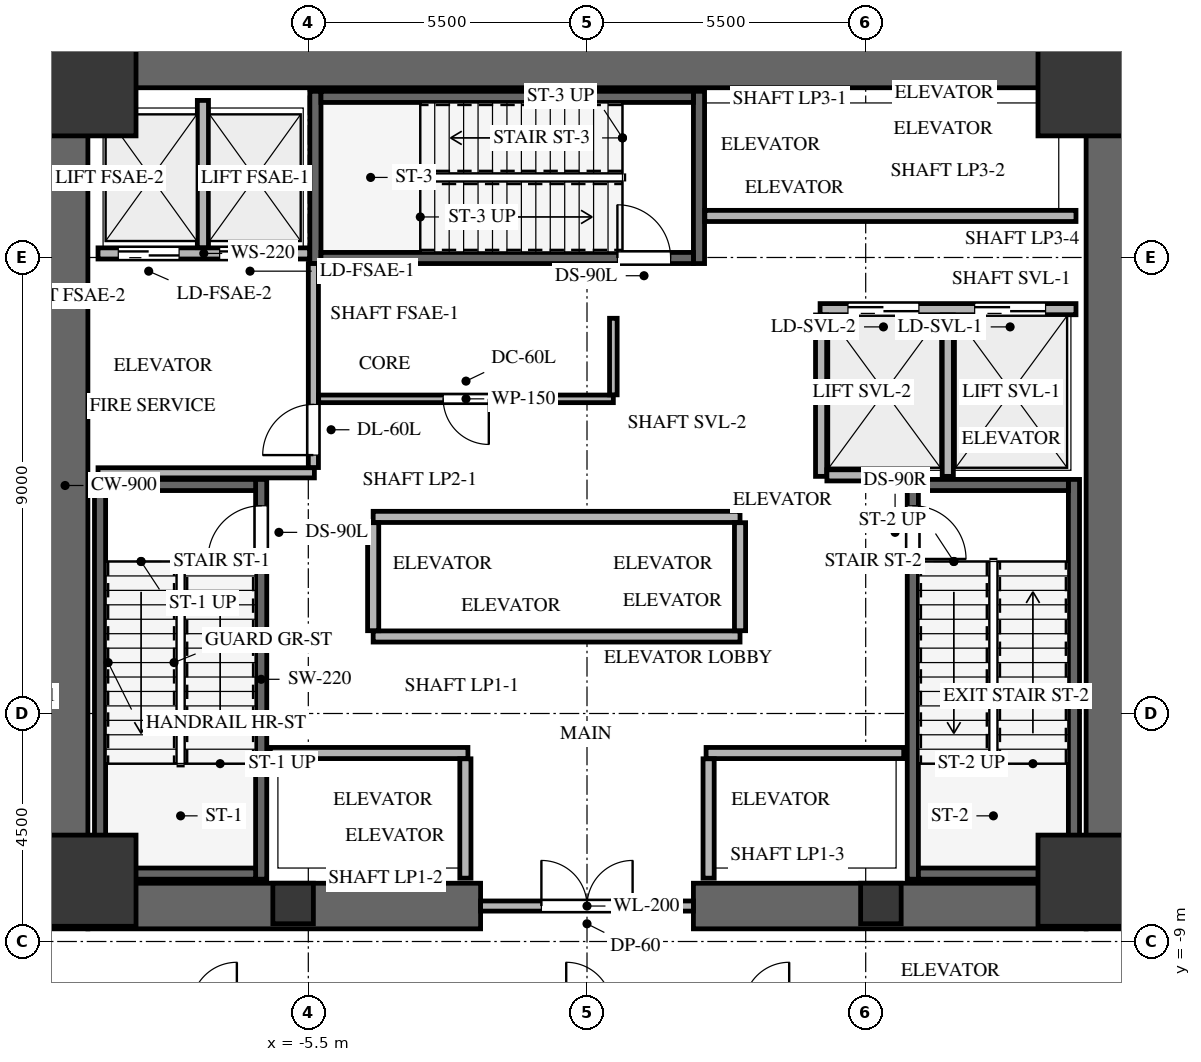
"""IFC4 building model, lengths in metres.
Left out: names, types, materials, properties, quantities, classifications, styles, units other than length and angle.
Written with IfcOpenShell. Run it as: python <this file> out.ifc"""

import sys

from ifc_helpers import new_model, si_unit, direction, frame, frame_2d, origin, origin_2d, place, context, subcontext, project, spatial, rectangle, extrude, source, transform, mapped, element, fill, save


model = new_model("IFC4")
c1 = context("Model", 3, precision=1e-05, world=origin(), true_north=direction((0.0, 1.0)))
c2 = subcontext(c1, "Body", "Model", "MODEL_VIEW")
j1 = project(units=[si_unit("LENGTHUNIT", "METRE"), si_unit("PLANEANGLEUNIT", "RADIAN")], contexts=[c1])
p1 = place(None, origin())
s1 = spatial("IfcSite", under=j1, at=p1, CompositionType="ELEMENT")
p2 = place(p1, origin())
s2 = spatial("IfcBuilding", under=s1, at=p2, CompositionType="ELEMENT")
p3 = place(p2, frame((0.0, 0.0, 10.4)))
s3 = spatial("IfcBuildingStorey", under=s2, at=p3, CompositionType="ELEMENT", Elevation=10.4)
for number, where, z_axis, x_axis in (
    (1, (-10.3, -8.75, 0.0), (0.0, 0.0, 1.0), (0.0, 1.0, 0.0)),
    (2, (10.3, -8.75, 0.0), (0.0, 0.0, 1.0), (0.0, 1.0, 0.0)),
):
    element("IfcWall", number, at=place(p3, frame(where, z_axis=z_axis, x_axis=x_axis)), inside=s3, PredefinedType="SHEAR", context=c2, shape_type="SweptSolid", body=[
        extrude(rectangle(XDim=17.5, YDim=0.9, at=frame_2d((8.75, 0.0))), origin(), (0.0, 0.0, 1.0), 5.2),
    ])
for number, where, z_axis, x_axis in (
    (3, (-9.85, -8.3, 0.0), (0.0, 0.0, 1.0), (1.0, 0.0, 0.0)),
    (4, (2.1, -8.3, 0.0), (0.0, 0.0, 1.0), (1.0, 0.0, 0.0)),
):
    element("IfcWall", number, at=place(p3, frame(where, z_axis=z_axis, x_axis=x_axis)), inside=s3, PredefinedType="SHEAR", context=c2, shape_type="SweptSolid", body=[
        extrude(rectangle(XDim=7.75, YDim=0.9, at=frame_2d((3.875, 0.0))), origin(), (0.0, 0.0, 1.0), 5.2),
    ])
p4 = place(p3, frame((-9.85, 8.3, 0.0), z_axis=(0.0, 0.0, 1.0), x_axis=(1.0, 0.0, 0.0)))
e5 = element("IfcWall", 5, at=p4, inside=s3, PredefinedType="SHEAR", context=c2, shape_type="SweptSolid", body=[
    extrude(rectangle(XDim=19.7, YDim=0.9, at=frame_2d((9.85, 0.0))), origin(), (0.0, 0.0, 1.0), 5.2),
])
p5 = place(p3, frame((-6.43, -7.77, -0.35), z_axis=(0.0, 0.0, 1.0), x_axis=(0.0, 1.0, 0.0)))
e6 = element("IfcWall", 6, at=p5, inside=s3, PredefinedType="SHEAR", context=c2, shape_type="SweptSolid", body=[
    extrude(rectangle(XDim=7.89, YDim=0.22, at=frame_2d((3.945, 0.0))), origin(), (0.0, 0.0, 1.0), 5.23),
])
p6 = place(p5, frame((6.32, 0.0, 0.0)))
e7 = element("IfcOpeningElement", 7, at=p6, cuts=e6, PredefinedType="OPENING", context=c2, shape_type="SweptSolid", body=[
    extrude(rectangle(XDim=1.05, YDim=2.15, at=frame_2d((0.525, 1.075))), frame((0.0, 0.12, 0.0), z_axis=(0.0, -1.0, 0.0), x_axis=(1.0, 0.0, 0.0)), (0.0, 0.0, 1.0), 0.24),
])
p7 = place(p3, frame((-9.61, 0.12, -0.35), z_axis=(0.0, 0.0, 1.0), x_axis=(0.0, -1.0, 0.0)))
e8 = element("IfcWall", 8, at=p7, inside=s3, PredefinedType="SHEAR", context=c2, shape_type="SweptSolid", body=[
    extrude(rectangle(XDim=7.89, YDim=0.22, at=frame_2d((3.945, 0.0))), origin(), (0.0, 0.0, 1.0), 5.23),
])
for number, where, z_axis, x_axis in (
    (9, (-9.5, -7.66, -0.35), (0.0, 0.0, 1.0), (1.0, 0.0, 0.0)),
    (10, (-6.54, 0.01, -0.35), (0.0, 0.0, 1.0), (-1.0, 0.0, 0.0)),
):
    element("IfcWall", number, at=place(p3, frame(where, z_axis=z_axis, x_axis=x_axis)), inside=s3, PredefinedType="SHEAR", context=c2, shape_type="SweptSolid", body=[
        extrude(rectangle(XDim=2.96, YDim=0.22, at=frame_2d((1.48, 0.0))), origin(), (0.0, 0.0, 1.0), 5.23),
    ])
p8 = place(p3, frame((9.61, -7.77, -0.35), z_axis=(0.0, 0.0, 1.0), x_axis=(0.0, 1.0, 0.0)))
e11 = element("IfcWall", 11, at=p8, inside=s3, PredefinedType="SHEAR", context=c2, shape_type="SweptSolid", body=[
    extrude(rectangle(XDim=7.89, YDim=0.22, at=frame_2d((3.945, 0.0))), origin(), (0.0, 0.0, 1.0), 5.23),
])
p9 = place(p3, frame((6.43, 0.12, -0.35), z_axis=(0.0, 0.0, 1.0), x_axis=(0.0, -1.0, 0.0)))
e12 = element("IfcWall", 12, at=p9, inside=s3, PredefinedType="SHEAR", context=c2, shape_type="SweptSolid", body=[
    extrude(rectangle(XDim=7.89, YDim=0.22, at=frame_2d((3.945, 0.0))), origin(), (0.0, 0.0, 1.0), 5.23),
])
p10 = place(p9, frame((0.52, 0.0, 0.0)))
e13 = element("IfcOpeningElement", 13, at=p10, cuts=e12, PredefinedType="OPENING", context=c2, shape_type="SweptSolid", body=[
    extrude(rectangle(XDim=1.05, YDim=2.15, at=frame_2d((0.525, 1.075))), frame((0.0, 0.12, 0.0), z_axis=(0.0, -1.0, 0.0), x_axis=(1.0, 0.0, 0.0)), (0.0, 0.0, 1.0), 0.24),
])
for number, where, z_axis, x_axis in (
    (14, (6.54, -7.66, -0.35), (0.0, 0.0, 1.0), (1.0, 0.0, 0.0)),
    (15, (9.5, 0.01, -0.35), (0.0, 0.0, 1.0), (-1.0, 0.0, 0.0)),
):
    element("IfcWall", number, at=place(p3, frame(where, z_axis=z_axis, x_axis=x_axis)), inside=s3, PredefinedType="SHEAR", context=c2, shape_type="SweptSolid", body=[
        extrude(rectangle(XDim=2.96, YDim=0.22, at=frame_2d((1.48, 0.0))), origin(), (0.0, 0.0, 1.0), 5.23),
    ])
for number, where, z_axis, x_axis in (
    (16, (2.21, 4.38, -0.35), (0.0, 0.0, 1.0), (0.0, 1.0, 0.0)),
    (17, (-5.36, 7.78, -0.35), (0.0, 0.0, 1.0), (0.0, -1.0, 0.0)),
):
    element("IfcWall", number, at=place(p3, frame(where, z_axis=z_axis, x_axis=x_axis)), inside=s3, PredefinedType="SHEAR", context=c2, shape_type="SweptSolid", body=[
        extrude(rectangle(XDim=3.4, YDim=0.22, at=frame_2d((1.7, 0.0))), origin(), (0.0, 0.0, 1.0), 5.23),
    ])
p11 = place(p3, frame((-5.25, 4.49, -0.35), z_axis=(0.0, 0.0, 1.0), x_axis=(1.0, 0.0, 0.0)))
e18 = element("IfcWall", 18, at=p11, inside=s3, PredefinedType="SHEAR", context=c2, shape_type="SweptSolid", body=[
    extrude(rectangle(XDim=7.35, YDim=0.22, at=frame_2d((3.675, 0.0))), origin(), (0.0, 0.0, 1.0), 5.23),
])
p12 = place(p11, frame((5.85, 0.0, 0.0)))
e19 = element("IfcOpeningElement", 19, at=p12, cuts=e18, PredefinedType="OPENING", context=c2, shape_type="SweptSolid", body=[
    extrude(rectangle(XDim=1.05, YDim=2.15, at=frame_2d((0.525, 1.075))), frame((0.0, 0.12, 0.0), z_axis=(0.0, -1.0, 0.0), x_axis=(1.0, 0.0, 0.0)), (0.0, 0.0, 1.0), 0.24),
])
p13 = place(p3, frame((2.1, 7.67, -0.35), z_axis=(0.0, 0.0, 1.0), x_axis=(-1.0, 0.0, 0.0)))
e20 = element("IfcWall", 20, at=p13, inside=s3, PredefinedType="SHEAR", context=c2, shape_type="SweptSolid", body=[
    extrude(rectangle(XDim=7.35, YDim=0.22, at=frame_2d((3.675, 0.0))), origin(), (0.0, 0.0, 1.0), 5.23),
])
m1 = source(origin(), c2, "Body", "SweptSolid", [
    extrude(rectangle(XDim=1.8, YDim=1.8, at=origin_2d()), origin(), (0.0, 0.0, 1.0), 5.23),
])
for number, where, z_axis, x_axis in (
    (21, (-9.8, -7.8, -0.35), (0.0, 0.0, 1.0), (1.0, 0.0, 0.0)),
    (22, (9.8, -7.8, -0.35), (0.0, 0.0, 1.0), (1.0, 0.0, 0.0)),
    (23, (9.8, 7.8, -0.35), (0.0, 0.0, 1.0), (1.0, 0.0, 0.0)),
    (24, (-9.8, 7.8, -0.35), (0.0, 0.0, 1.0), (1.0, 0.0, 0.0)),
):
    element("IfcColumn", number, at=place(p3, frame(where, z_axis=z_axis, x_axis=x_axis)), inside=s3, PredefinedType="COLUMN", context=c2, shape_type="MappedRepresentation", body=[
        mapped(m1, transform((0.0, 0.0, 0.0), x_axis=(1.0, 0.0, 0.0), y_axis=(0.0, 1.0, 0.0), z_axis=(0.0, 0.0, 1.0), scale=1.0)),
    ])
m2 = source(origin(), c2, "Body", "SweptSolid", [
    extrude(rectangle(XDim=0.8, YDim=0.8, at=origin_2d()), origin(), (0.0, 0.0, 1.0), 5.23),
])
for number, where, z_axis, x_axis in (
    (25, (-5.8, -8.25, -0.35), (0.0, 0.0, 1.0), (1.0, 0.0, 0.0)),
    (26, (5.8, -8.25, -0.35), (0.0, 0.0, 1.0), (1.0, 0.0, 0.0)),
):
    element("IfcColumn", number, at=place(p3, frame(where, z_axis=z_axis, x_axis=x_axis)), inside=s3, PredefinedType="PILASTER", context=c2, shape_type="MappedRepresentation", body=[
        mapped(m2, transform((0.0, 0.0, 0.0), x_axis=(1.0, 0.0, 0.0), y_axis=(0.0, 1.0, 0.0), z_axis=(0.0, 0.0, 1.0), scale=1.0)),
    ])
p14 = place(p3, frame((-2.1, -8.3, 0.0), z_axis=(0.0, 0.0, 1.0), x_axis=(1.0, 0.0, 0.0)))
e27 = element("IfcWall", 27, at=p14, inside=s3, PredefinedType="SOLIDWALL", context=c2, shape_type="SweptSolid", body=[
    extrude(rectangle(XDim=4.2, YDim=0.2, at=frame_2d((2.1, 0.0))), origin(), (0.0, 0.0, 1.0), 4.865),
])
p15 = place(p14, frame((1.2, 0.0, 0.0)))
e28 = element("IfcOpeningElement", 28, at=p15, cuts=e27, PredefinedType="OPENING", context=c2, shape_type="SweptSolid", body=[
    extrude(rectangle(XDim=1.8, YDim=2.15, at=frame_2d((0.9, 1.075))), frame((0.0, 0.11, 0.0), z_axis=(0.0, -1.0, 0.0), x_axis=(1.0, 0.0, 0.0)), (0.0, 0.0, 1.0), 0.22),
])
p16 = place(p3, frame((-9.65, 4.58, 0.0), z_axis=(0.0, 0.0, 1.0), x_axis=(1.0, 0.0, 0.0)))
e29 = element("IfcWall", 29, at=p16, inside=s3, PredefinedType="SOLIDWALL", context=c2, shape_type="SweptSolid", body=[
    extrude(rectangle(XDim=4.175, YDim=0.22, at=frame_2d((2.087, 0.0))), origin(), (0.0, 0.0, 1.0), 4.865),
])
p17 = place(p16, frame((0.4, 0.0, 0.0)))
e30 = element("IfcOpeningElement", 30, at=p17, cuts=e29, PredefinedType="OPENING", context=c2, shape_type="SweptSolid", body=[
    extrude(rectangle(XDim=1.2, YDim=2.15, at=frame_2d((0.6, 1.075))), frame((0.0, 0.12, 0.0), z_axis=(0.0, -1.0, 0.0), x_axis=(1.0, 0.0, 0.0)), (0.0, 0.0, 1.0), 0.24),
])
p18 = place(p16, frame((2.4, 0.0, 0.0)))
e31 = element("IfcOpeningElement", 31, at=p18, cuts=e29, PredefinedType="OPENING", context=c2, shape_type="SweptSolid", body=[
    extrude(rectangle(XDim=1.2, YDim=2.15, at=frame_2d((0.6, 1.075))), frame((0.0, 0.12, 0.0), z_axis=(0.0, -1.0, 0.0), x_axis=(1.0, 0.0, 0.0)), (0.0, 0.0, 1.0), 0.24),
])
p19 = place(p3, frame((-7.58, 4.694, 0.0), z_axis=(0.0, 0.0, 1.0), x_axis=(0.0, 1.0, 0.0)))
e32 = element("IfcWall", 32, at=p19, inside=s3, PredefinedType="SOLIDWALL", context=c2, shape_type="SweptSolid", body=[
    extrude(rectangle(XDim=2.906, YDim=0.22, at=frame_2d((1.453, 0.0))), origin(), (0.0, 0.0, 1.0), 4.865),
])
p20 = place(p3, frame((-9.65, 0.25, 0.0), z_axis=(0.0, 0.0, 1.0), x_axis=(1.0, 0.0, 0.0)))
e33 = element("IfcWall", 33, at=p20, inside=s3, PredefinedType="SOLIDWALL", context=c2, shape_type="SweptSolid", body=[
    extrude(rectangle(XDim=4.27, YDim=0.2, at=frame_2d((2.135, 0.0))), origin(), (0.0, 0.0, 1.0), 4.865),
])
p21 = place(p3, frame((-5.4, 0.354, 0.0), z_axis=(0.0, 0.0, 1.0), x_axis=(0.0, 1.0, 0.0)))
e34 = element("IfcWall", 34, at=p21, inside=s3, PredefinedType="SOLIDWALL", context=c2, shape_type="SweptSolid", body=[
    extrude(rectangle(XDim=4.026, YDim=0.2, at=frame_2d((2.013, 0.0))), origin(), (0.0, 0.0, 1.0), 4.865),
])
p22 = place(p21, frame((0.246, 0.0, 0.0)))
e35 = element("IfcOpeningElement", 35, at=p22, cuts=e34, PredefinedType="OPENING", context=c2, shape_type="SweptSolid", body=[
    extrude(rectangle(XDim=1.0, YDim=2.15, at=frame_2d((0.5, 1.075))), frame((0.0, 0.11, 0.0), z_axis=(0.0, -1.0, 0.0), x_axis=(1.0, 0.0, 0.0)), (0.0, 0.0, 1.0), 0.22),
])
p23 = place(p3, frame((4.6, 3.48, 0.0), z_axis=(0.0, 0.0, 1.0), x_axis=(1.0, 0.0, 0.0)))
e36 = element("IfcWall", 36, at=p23, inside=s3, PredefinedType="SOLIDWALL", context=c2, shape_type="SweptSolid", body=[
    extrude(rectangle(XDim=5.05, YDim=0.22, at=frame_2d((2.525, 0.0))), origin(), (0.0, 0.0, 1.0), 4.865),
])
p24 = place(p23, frame((0.55, 0.0, 0.0)))
e37 = element("IfcOpeningElement", 37, at=p24, cuts=e36, PredefinedType="OPENING", context=c2, shape_type="SweptSolid", body=[
    extrude(rectangle(XDim=1.4, YDim=2.15, at=frame_2d((0.7, 1.075))), frame((0.0, 0.12, 0.0), z_axis=(0.0, -1.0, 0.0), x_axis=(1.0, 0.0, 0.0)), (0.0, 0.0, 1.0), 0.24),
])
p25 = place(p23, frame((3.05, 0.0, 0.0)))
e38 = element("IfcOpeningElement", 38, at=p25, cuts=e36, PredefinedType="OPENING", context=c2, shape_type="SweptSolid", body=[
    extrude(rectangle(XDim=1.4, YDim=2.15, at=frame_2d((0.7, 1.075))), frame((0.0, 0.12, 0.0), z_axis=(0.0, -1.0, 0.0), x_axis=(1.0, 0.0, 0.0)), (0.0, 0.0, 1.0), 0.24),
])
for number, where, z_axis, x_axis in (
    (39, (4.62, 0.18, 0.0), (0.0, 0.0, 1.0), (0.0, 1.0, 0.0)),
    (40, (7.12, 0.18, 0.0), (0.0, 0.0, 1.0), (0.0, 1.0, 0.0)),
):
    element("IfcWall", number, at=place(p3, frame(where, z_axis=z_axis, x_axis=x_axis)), inside=s3, PredefinedType="SOLIDWALL", context=c2, shape_type="SweptSolid", body=[
        extrude(rectangle(XDim=3.186, YDim=0.22, at=frame_2d((1.593, 0.0))), origin(), (0.0, 0.0, 1.0), 4.865),
    ])
p26 = place(p3, frame((4.734, 0.2, 0.0), z_axis=(0.0, 0.0, 1.0), x_axis=(1.0, 0.0, 0.0)))
e41 = element("IfcWall", 41, at=p26, inside=s3, PredefinedType="SOLIDWALL", context=c2, shape_type="SweptSolid", body=[
    extrude(rectangle(XDim=1.666, YDim=0.22, at=frame_2d((0.833, 0.0))), origin(), (0.0, 0.0, 1.0), 4.865),
])
for number, where, z_axis, x_axis in (
    (42, (-6.25, -5.28, 0.0), (0.0, 0.0, 1.0), (1.0, 0.0, 0.0)),
    (43, (2.35, -5.28, 0.0), (0.0, 0.0, 1.0), (1.0, 0.0, 0.0)),
):
    element("IfcWall", number, at=place(p3, frame(where, z_axis=z_axis, x_axis=x_axis)), inside=s3, PredefinedType="SOLIDWALL", context=c2, shape_type="SweptSolid", body=[
        extrude(rectangle(XDim=3.9, YDim=0.22, at=frame_2d((1.95, 0.0))), origin(), (0.0, 0.0, 1.0), 4.865),
    ])
for number, where, z_axis, x_axis in (
    (44, (-2.4, -7.75, 0.0), (0.0, 0.0, 1.0), (0.0, 1.0, 0.0)),
    (45, (2.4, -7.75, 0.0), (0.0, 0.0, 1.0), (0.0, 1.0, 0.0)),
):
    element("IfcWall", number, at=place(p3, frame(where, z_axis=z_axis, x_axis=x_axis)), inside=s3, PredefinedType="SOLIDWALL", context=c2, shape_type="SweptSolid", body=[
        extrude(rectangle(XDim=2.356, YDim=0.22, at=frame_2d((1.178, 0.0))), origin(), (0.0, 0.0, 1.0), 4.865),
    ])
for number, where, z_axis, x_axis in (
    (46, (-4.22, -2.98, 0.0), (0.0, 0.0, 1.0), (1.0, 0.0, 0.0)),
    (47, (-4.22, -0.62, 0.0), (0.0, 0.0, 1.0), (1.0, 0.0, 0.0)),
):
    element("IfcWall", number, at=place(p3, frame(where, z_axis=z_axis, x_axis=x_axis)), inside=s3, PredefinedType="SOLIDWALL", context=c2, shape_type="SweptSolid", body=[
        extrude(rectangle(XDim=7.24, YDim=0.22, at=frame_2d((3.62, 0.0))), origin(), (0.0, 0.0, 1.0), 4.865),
    ])
for number, where, z_axis, x_axis in (
    (48, (-4.22, -2.866, 0.0), (0.0, 0.0, 1.0), (0.0, 1.0, 0.0)),
    (49, (3.02, -2.866, 0.0), (0.0, 0.0, 1.0), (0.0, 1.0, 0.0)),
):
    element("IfcWall", number, at=place(p3, frame(where, z_axis=z_axis, x_axis=x_axis)), inside=s3, PredefinedType="SOLIDWALL", context=c2, shape_type="SweptSolid", body=[
        extrude(rectangle(XDim=2.132, YDim=0.22, at=frame_2d((1.066, 0.0))), origin(), (0.0, 0.0, 1.0), 4.865),
    ])
p27 = place(p3, frame((2.325, 5.32, 0.0), z_axis=(0.0, 0.0, 1.0), x_axis=(1.0, 0.0, 0.0)))
e50 = element("IfcWall", 50, at=p27, inside=s3, PredefinedType="SOLIDWALL", context=c2, shape_type="SweptSolid", body=[
    extrude(rectangle(XDim=7.325, YDim=0.22, at=frame_2d((3.663, 0.0))), origin(), (0.0, 0.0, 1.0), 4.865),
])
p28 = place(p3, frame((0.52, 1.71, 0.0), z_axis=(0.0, 0.0, 1.0), x_axis=(-1.0, 0.0, 0.0)))
e51 = element("IfcWall", 51, at=p28, inside=s3, PredefinedType="PARTITIONING", context=c2, shape_type="SweptSolid", body=[
    extrude(rectangle(XDim=5.816, YDim=0.15, at=frame_2d((2.908, 0.0))), origin(), (0.0, 0.0, 1.0), 4.865),
])
p29 = place(p28, frame((2.458, 0.0, 0.0)))
e52 = element("IfcOpeningElement", 52, at=p29, cuts=e51, PredefinedType="OPENING", context=c2, shape_type="SweptSolid", body=[
    extrude(rectangle(XDim=0.9, YDim=2.05, at=frame_2d((0.45, 1.025))), frame((0.0, 0.085, 0.0), z_axis=(0.0, -1.0, 0.0), x_axis=(1.0, 0.0, 0.0)), (0.0, 0.0, 1.0), 0.17),
])
p30 = place(p3, frame((0.52, 3.3, 0.0), z_axis=(0.0, 0.0, 1.0), x_axis=(0.0, -1.0, 0.0)))
e53 = element("IfcWall", 53, at=p30, inside=s3, PredefinedType="PARTITIONING", context=c2, shape_type="SweptSolid", body=[
    extrude(rectangle(XDim=1.511, YDim=0.15, at=frame_2d((0.755, 0.0))), origin(), (0.0, 0.0, 1.0), 4.865),
])
m3 = source(origin(), c2, "Body", "SweptSolid", [
    extrude(rectangle(XDim=1.05, YDim=2.15, at=frame_2d((0.525, 1.075))), frame((0.0, 0.025, 0.0), z_axis=(0.0, -1.0, 0.0), x_axis=(1.0, 0.0, 0.0)), (0.0, 0.0, 1.0), 0.05),
])
p31 = place(p6, origin())
e54 = element("IfcDoor", 54, at=p31, inside=s3, OperationType="SINGLE_SWING_LEFT", PredefinedType="DOOR", context=c2, shape_type="MappedRepresentation", body=[
    mapped(m3, transform((0.0, 0.0, 0.0), x_axis=(1.0, 0.0, 0.0), y_axis=(0.0, 1.0, 0.0), z_axis=(0.0, 0.0, 1.0), scale=1.0)),
])
fill(e7, e54)
m4 = source(origin(), c2, "Body", "SweptSolid", [
    extrude(rectangle(XDim=1.05, YDim=2.15, at=frame_2d((0.525, 1.075))), frame((0.0, 0.025, 0.0), z_axis=(0.0, -1.0, 0.0), x_axis=(1.0, 0.0, 0.0)), (0.0, 0.0, 1.0), 0.05),
])
p32 = place(p10, origin())
e55 = element("IfcDoor", 55, at=p32, inside=s3, OperationType="SINGLE_SWING_RIGHT", PredefinedType="DOOR", context=c2, shape_type="MappedRepresentation", body=[
    mapped(m4, transform((0.0, 0.0, 0.0), x_axis=(1.0, 0.0, 0.0), y_axis=(0.0, 1.0, 0.0), z_axis=(0.0, 0.0, 1.0), scale=1.0)),
])
fill(e13, e55)
p33 = place(p12, origin())
e56 = element("IfcDoor", 56, at=p33, inside=s3, OperationType="SINGLE_SWING_LEFT", PredefinedType="DOOR", context=c2, shape_type="MappedRepresentation", body=[
    mapped(m3, transform((0.0, 0.0, 0.0), x_axis=(1.0, 0.0, 0.0), y_axis=(0.0, 1.0, 0.0), z_axis=(0.0, 0.0, 1.0), scale=1.0)),
])
fill(e19, e56)
m5 = source(origin(), c2, "Body", "SweptSolid", [
    extrude(rectangle(XDim=1.8, YDim=2.15, at=frame_2d((0.9, 1.075))), frame((0.0, 0.025, 0.0), z_axis=(0.0, -1.0, 0.0), x_axis=(1.0, 0.0, 0.0)), (0.0, 0.0, 1.0), 0.05),
])
p34 = place(p15, origin())
e57 = element("IfcDoor", 57, at=p34, inside=s3, OperationType="DOUBLE_DOOR_SINGLE_SWING", PredefinedType="DOOR", context=c2, shape_type="MappedRepresentation", body=[
    mapped(m5, transform((0.0, 0.0, 0.0), x_axis=(1.0, 0.0, 0.0), y_axis=(0.0, 1.0, 0.0), z_axis=(0.0, 0.0, 1.0), scale=1.0)),
])
fill(e28, e57)
m6 = source(origin(), c2, "Body", "SweptSolid", [
    extrude(rectangle(XDim=1.2, YDim=2.15, at=frame_2d((0.6, 1.075))), frame((0.0, 0.025, 0.0), z_axis=(0.0, -1.0, 0.0), x_axis=(1.0, 0.0, 0.0)), (0.0, 0.0, 1.0), 0.05),
])
p35 = place(p17, origin())
e58 = element("IfcDoor", 58, at=p35, inside=s3, OperationType="DOUBLE_DOOR_SLIDING", PredefinedType="DOOR", context=c2, shape_type="MappedRepresentation", body=[
    mapped(m6, transform((0.0, 0.0, 0.0), x_axis=(1.0, 0.0, 0.0), y_axis=(0.0, 1.0, 0.0), z_axis=(0.0, 0.0, 1.0), scale=1.0)),
])
fill(e30, e58)
p36 = place(p18, origin())
e59 = element("IfcDoor", 59, at=p36, inside=s3, OperationType="DOUBLE_DOOR_SLIDING", PredefinedType="DOOR", context=c2, shape_type="MappedRepresentation", body=[
    mapped(m6, transform((0.0, 0.0, 0.0), x_axis=(1.0, 0.0, 0.0), y_axis=(0.0, 1.0, 0.0), z_axis=(0.0, 0.0, 1.0), scale=1.0)),
])
fill(e31, e59)
m7 = source(origin(), c2, "Body", "SweptSolid", [
    extrude(rectangle(XDim=1.0, YDim=2.15, at=frame_2d((0.5, 1.075))), frame((0.0, 0.025, 0.0), z_axis=(0.0, -1.0, 0.0), x_axis=(1.0, 0.0, 0.0)), (0.0, 0.0, 1.0), 0.05),
])
p37 = place(p22, origin())
e60 = element("IfcDoor", 60, at=p37, inside=s3, OperationType="SINGLE_SWING_LEFT", PredefinedType="DOOR", context=c2, shape_type="MappedRepresentation", body=[
    mapped(m7, transform((0.0, 0.0, 0.0), x_axis=(1.0, 0.0, 0.0), y_axis=(0.0, 1.0, 0.0), z_axis=(0.0, 0.0, 1.0), scale=1.0)),
])
fill(e35, e60)
m8 = source(origin(), c2, "Body", "SweptSolid", [
    extrude(rectangle(XDim=1.4, YDim=2.15, at=frame_2d((0.7, 1.075))), frame((0.0, 0.025, 0.0), z_axis=(0.0, -1.0, 0.0), x_axis=(1.0, 0.0, 0.0)), (0.0, 0.0, 1.0), 0.05),
])
p38 = place(p24, origin())
e61 = element("IfcDoor", 61, at=p38, inside=s3, OperationType="DOUBLE_DOOR_SLIDING", PredefinedType="DOOR", context=c2, shape_type="MappedRepresentation", body=[
    mapped(m8, transform((0.0, 0.0, 0.0), x_axis=(1.0, 0.0, 0.0), y_axis=(0.0, 1.0, 0.0), z_axis=(0.0, 0.0, 1.0), scale=1.0)),
])
fill(e37, e61)
p39 = place(p25, origin())
e62 = element("IfcDoor", 62, at=p39, inside=s3, OperationType="DOUBLE_DOOR_SLIDING", PredefinedType="DOOR", context=c2, shape_type="MappedRepresentation", body=[
    mapped(m8, transform((0.0, 0.0, 0.0), x_axis=(1.0, 0.0, 0.0), y_axis=(0.0, 1.0, 0.0), z_axis=(0.0, 0.0, 1.0), scale=1.0)),
])
fill(e38, e62)
m9 = source(origin(), c2, "Body", "SweptSolid", [
    extrude(rectangle(XDim=0.9, YDim=2.05, at=frame_2d((0.45, 1.025))), frame((0.0, 0.025, 0.0), z_axis=(0.0, -1.0, 0.0), x_axis=(1.0, 0.0, 0.0)), (0.0, 0.0, 1.0), 0.05),
])
p40 = place(p29, origin())
e63 = element("IfcDoor", 63, at=p40, inside=s3, OperationType="SINGLE_SWING_LEFT", PredefinedType="DOOR", context=c2, shape_type="MappedRepresentation", body=[
    mapped(m9, transform((0.0, 0.0, 0.0), x_axis=(1.0, 0.0, 0.0), y_axis=(0.0, 1.0, 0.0), z_axis=(0.0, 0.0, 1.0), scale=1.0)),
])
fill(e52, e63)
save(model, sys.argv[1])
